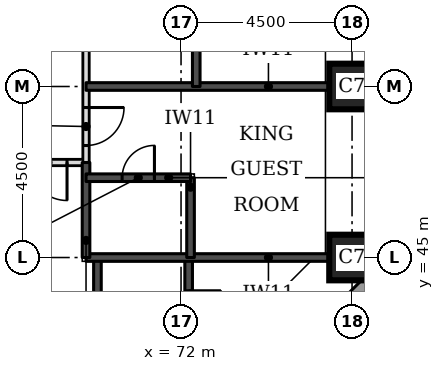
"""IFC4 building model, lengths in metres.
Left out: names, types, materials, properties, quantities, classifications, styles, units other than length and angle.
Written with IfcOpenShell. Run it as: python <this file> out.ifc"""

import sys

from ifc_helpers import new_model, si_unit, direction, frame, frame_2d, origin, origin_2d, place, context, subcontext, project, spatial, rectangle, extrude, element, fill, save


model = new_model("IFC4")
c1 = context("Model", 3, precision=1e-05, world=origin(), true_north=direction((0.0, 1.0)))
c2 = subcontext(c1, "Body", "Model", "MODEL_VIEW")
j1 = project(units=[si_unit("LENGTHUNIT", "METRE"), si_unit("PLANEANGLEUNIT", "RADIAN")], contexts=[c1])
p1 = place(None, origin())
s1 = spatial("IfcSite", under=j1, at=p1, CompositionType="ELEMENT")
p2 = place(p1, origin())
s2 = spatial("IfcBuilding", under=s1, at=p2, CompositionType="ELEMENT")
p3 = place(p2, frame((0.0, 0.0, 52.8)))
s3 = spatial("IfcBuildingStorey", under=s2, at=p3, CompositionType="ELEMENT", Elevation=52.8)
for number, where, z_axis, x_axis in (
    (1, (76.5, 45.0, 0.0), (0.0, 0.0, 1.0), (1.0, 0.0, 0.0)),
    (2, (76.5, 49.5, 0.0), (0.0, 0.0, 1.0), (1.0, 0.0, 0.0)),
):
    element("IfcColumn", number, at=place(p3, frame(where, z_axis=z_axis, x_axis=x_axis)), inside=s3, PredefinedType="COLUMN", context=c2, shape_type="SweptSolid", body=[
        extrude(rectangle(XDim=1.2, YDim=1.2, at=origin_2d()), origin(), (0.0, 0.0, 1.0), 3.3),
    ])
p4 = place(p3, frame((72.27, 39.674, 0.0), z_axis=(0.0, 0.0, 1.0), x_axis=(0.707106781187, 0.707106781187, 0.0)))
e3 = element("IfcWall", 3, at=p4, inside=s3, PredefinedType="STANDARD", context=c2, shape_type="SweptSolid", body=[
    extrude(rectangle(XDim=7.151, YDim=0.35, at=frame_2d((3.576, 0.0))), origin(), (0.0, 0.0, 1.0), 3.055),
])
p5 = place(p4, frame((1.926, 0.0, 0.8)))
e4 = element("IfcOpeningElement", 4, at=p5, cuts=e3, PredefinedType="OPENING", context=c2, shape_type="SweptSolid", body=[
    extrude(rectangle(XDim=3.3, YDim=1.5, at=frame_2d((1.65, 0.75))), frame((0.0, 0.185, 0.0), z_axis=(0.0, -1.0, 0.0), x_axis=(1.0, 0.0, 0.0)), (0.0, 0.0, 1.0), 0.37),
])
p6 = place(p3, frame((52.85, 47.5, 0.0), z_axis=(0.0, 0.0, 1.0), x_axis=(1.0, 0.0, 0.0)))
e5 = element("IfcWall", 5, at=p6, inside=s3, PredefinedType="PARTITIONING", context=c2, shape_type="SweptSolid", body=[
    extrude(rectangle(XDim=16.65, YDim=0.15, at=frame_2d((8.325, 0.0))), origin(), (0.0, 0.0, 1.0), 3.08),
])
p7 = place(p6, frame((11.3, 0.0, 0.0)))
e6 = element("IfcOpeningElement", 6, at=p7, cuts=e5, PredefinedType="OPENING", context=c2, shape_type="SweptSolid", body=[
    extrude(rectangle(XDim=1.1, YDim=2.1, at=frame_2d((0.55, 1.05))), frame((0.0, 0.085, 0.0), z_axis=(0.0, -1.0, 0.0), x_axis=(1.0, 0.0, 0.0)), (0.0, 0.0, 1.0), 0.17),
])
p8 = place(p6, frame((15.15, 0.0, 0.0)))
e7 = element("IfcOpeningElement", 7, at=p8, cuts=e5, PredefinedType="OPENING", context=c2, shape_type="SweptSolid", body=[
    extrude(rectangle(XDim=1.0, YDim=2.1, at=frame_2d((0.5, 1.05))), frame((0.0, 0.085, 0.0), z_axis=(0.0, -1.0, 0.0), x_axis=(1.0, 0.0, 0.0)), (0.0, 0.0, 1.0), 0.17),
])
p9 = place(p3, frame((69.5, 47.5, 0.0), z_axis=(0.0, 0.0, 1.0), x_axis=(0.0, 1.0, 0.0)))
e8 = element("IfcWall", 8, at=p9, inside=s3, PredefinedType="PARTITIONING", context=c2, shape_type="SweptSolid", body=[
    extrude(rectangle(XDim=26.5, YDim=0.15, at=frame_2d((13.25, 0.0))), origin(), (0.0, 0.0, 1.0), 3.08),
])
p10 = place(p9, frame((24.95, 0.0, 0.0)))
e9 = element("IfcOpeningElement", 9, at=p10, cuts=e8, PredefinedType="OPENING", context=c2, shape_type="SweptSolid", body=[
    extrude(rectangle(XDim=1.0, YDim=2.1, at=frame_2d((0.5, 1.05))), frame((0.0, 0.085, 0.0), z_axis=(0.0, -1.0, 0.0), x_axis=(1.0, 0.0, 0.0)), (0.0, 0.0, 1.0), 0.17),
])
p11 = place(p9, frame((20.7, 0.0, 0.0)))
e10 = element("IfcOpeningElement", 10, at=p11, cuts=e8, PredefinedType="OPENING", context=c2, shape_type="SweptSolid", body=[
    extrude(rectangle(XDim=1.0, YDim=2.1, at=frame_2d((0.5, 1.05))), frame((0.0, 0.085, 0.0), z_axis=(0.0, -1.0, 0.0), x_axis=(1.0, 0.0, 0.0)), (0.0, 0.0, 1.0), 0.17),
])
p12 = place(p9, frame((18.55, 0.0, 0.0)))
e11 = element("IfcOpeningElement", 11, at=p12, cuts=e8, PredefinedType="OPENING", context=c2, shape_type="SweptSolid", body=[
    extrude(rectangle(XDim=1.0, YDim=2.1, at=frame_2d((0.5, 1.05))), frame((0.0, 0.085, 0.0), z_axis=(0.0, -1.0, 0.0), x_axis=(1.0, 0.0, 0.0)), (0.0, 0.0, 1.0), 0.17),
])
p13 = place(p9, frame((11.7, 0.0, 0.0)))
e12 = element("IfcOpeningElement", 12, at=p13, cuts=e8, PredefinedType="OPENING", context=c2, shape_type="SweptSolid", body=[
    extrude(rectangle(XDim=1.0, YDim=2.1, at=frame_2d((0.5, 1.05))), frame((0.0, 0.085, 0.0), z_axis=(0.0, -1.0, 0.0), x_axis=(1.0, 0.0, 0.0)), (0.0, 0.0, 1.0), 0.17),
])
p14 = place(p9, frame((7.65, 0.0, 0.0)))
e13 = element("IfcOpeningElement", 13, at=p14, cuts=e8, PredefinedType="OPENING", context=c2, shape_type="SweptSolid", body=[
    extrude(rectangle(XDim=1.1, YDim=2.1, at=frame_2d((0.55, 1.05))), frame((0.0, 0.085, 0.0), z_axis=(0.0, -1.0, 0.0), x_axis=(1.0, 0.0, 0.0)), (0.0, 0.0, 1.0), 0.17),
])
p15 = place(p9, frame((0.447, 0.0, 0.0)))
e14 = element("IfcOpeningElement", 14, at=p15, cuts=e8, PredefinedType="OPENING", context=c2, shape_type="SweptSolid", body=[
    extrude(rectangle(XDim=1.0, YDim=2.1, at=frame_2d((0.5, 1.05))), frame((0.0, 0.085, 0.0), z_axis=(0.0, -1.0, 0.0), x_axis=(1.0, 0.0, 0.0)), (0.0, 0.0, 1.0), 0.17),
])
p16 = place(p3, frame((69.8, 42.5, 0.0), z_axis=(0.0, 0.0, 1.0), x_axis=(0.0, 1.0, 0.0)))
e15 = element("IfcWall", 15, at=p16, inside=s3, PredefinedType="SOLIDWALL", context=c2, shape_type="SweptSolid", body=[
    extrude(rectangle(XDim=2.5, YDim=0.2, at=frame_2d((1.25, 0.0))), origin(), (0.0, 0.0, 1.0), 3.08),
])
p17 = place(p3, frame((72.2, 42.5, 0.0), z_axis=(0.0, 0.0, 1.0), x_axis=(0.0, 1.0, 0.0)))
e16 = element("IfcWall", 16, at=p17, inside=s3, PredefinedType="SOLIDWALL", context=c2, shape_type="SweptSolid", body=[
    extrude(rectangle(XDim=2.5, YDim=0.2, at=frame_2d((1.25, 0.0))), origin(), (0.0, 0.0, 1.0), 3.08),
])
p18 = place(p17, frame((0.775, 0.0, 0.0)))
e17 = element("IfcOpeningElement", 17, at=p18, cuts=e16, PredefinedType="OPENING", context=c2, shape_type="SweptSolid", body=[
    extrude(rectangle(XDim=0.85, YDim=2.1, at=frame_2d((0.425, 1.05))), frame((0.0, 0.11, 0.0), z_axis=(0.0, -1.0, 0.0), x_axis=(1.0, 0.0, 0.0)), (0.0, 0.0, 1.0), 0.22),
])
p19 = place(p3, frame((69.5, 45.0, 0.0), z_axis=(0.0, 0.0, 1.0), x_axis=(1.0, 0.0, 0.0)))
e18 = element("IfcWall", 18, at=p19, inside=s3, PredefinedType="SOLIDWALL", context=c2, shape_type="SweptSolid", body=[
    extrude(rectangle(XDim=6.4, YDim=0.2, at=frame_2d((3.2, 0.0))), origin(), (0.0, 0.0, 1.0), 3.08),
])
p20 = place(p3, frame((69.5, 45.0, 0.0), z_axis=(0.0, 0.0, 1.0), x_axis=(0.0, 1.0, 0.0)))
e19 = element("IfcWall", 19, at=p20, inside=s3, PredefinedType="SOLIDWALL", context=c2, shape_type="SweptSolid", body=[
    extrude(rectangle(XDim=2.5, YDim=0.2, at=frame_2d((1.25, 0.0))), origin(), (0.0, 0.0, 1.0), 3.08),
])
p21 = place(p3, frame((72.25, 45.0, 0.0), z_axis=(0.0, 0.0, 1.0), x_axis=(0.0, 1.0, 0.0)))
e20 = element("IfcWall", 20, at=p21, inside=s3, PredefinedType="SOLIDWALL", context=c2, shape_type="SweptSolid", body=[
    extrude(rectangle(XDim=2.1, YDim=0.2, at=frame_2d((1.05, 0.0))), origin(), (0.0, 0.0, 1.0), 3.08),
])
p22 = place(p3, frame((69.5, 47.1, 0.0), z_axis=(0.0, 0.0, 1.0), x_axis=(1.0, 0.0, 0.0)))
e21 = element("IfcWall", 21, at=p22, inside=s3, PredefinedType="SOLIDWALL", context=c2, shape_type="SweptSolid", body=[
    extrude(rectangle(XDim=2.75, YDim=0.2, at=frame_2d((1.375, 0.0))), origin(), (0.0, 0.0, 1.0), 3.08),
])
p23 = place(p22, frame((0.95, 0.0, 0.0)))
e22 = element("IfcOpeningElement", 22, at=p23, cuts=e21, PredefinedType="OPENING", context=c2, shape_type="SweptSolid", body=[
    extrude(rectangle(XDim=0.85, YDim=2.1, at=frame_2d((0.425, 1.05))), frame((0.0, 0.11, 0.0), z_axis=(0.0, -1.0, 0.0), x_axis=(1.0, 0.0, 0.0)), (0.0, 0.0, 1.0), 0.22),
])
p24 = place(p3, frame((69.5, 49.5, 0.0), z_axis=(0.0, 0.0, 1.0), x_axis=(1.0, 0.0, 0.0)))
e23 = element("IfcWall", 23, at=p24, inside=s3, PredefinedType="SOLIDWALL", context=c2, shape_type="SweptSolid", body=[
    extrude(rectangle(XDim=6.4, YDim=0.2, at=frame_2d((3.2, 0.0))), origin(), (0.0, 0.0, 1.0), 3.08),
])
p25 = place(p3, frame((72.4, 49.5, 0.0), z_axis=(0.0, 0.0, 1.0), x_axis=(0.0, 1.0, 0.0)))
e24 = element("IfcWall", 24, at=p25, inside=s3, PredefinedType="SOLIDWALL", context=c2, shape_type="SweptSolid", body=[
    extrude(rectangle(XDim=3.4, YDim=0.2, at=frame_2d((1.7, 0.0))), origin(), (0.0, 0.0, 1.0), 3.08),
])
p26 = place(p15, frame((1.0, 0.0, 0.0), z_axis=(0.0, 0.0, 1.0), x_axis=(-1.0, 0.0, 0.0)))
e25 = element("IfcDoor", 25, at=p26, inside=s3, OperationType="SINGLE_SWING_LEFT", PredefinedType="DOOR", context=c2, shape_type="SweptSolid", body=[
    extrude(rectangle(XDim=1.0, YDim=2.1, at=frame_2d((0.5, 1.05))), frame((0.0, 0.025, 0.0), z_axis=(0.0, -1.0, 0.0), x_axis=(1.0, 0.0, 0.0)), (0.0, 0.0, 1.0), 0.05),
])
fill(e14, e25)
p27 = place(p23, origin())
e26 = element("IfcDoor", 26, at=p27, inside=s3, OperationType="SINGLE_SWING_RIGHT", PredefinedType="DOOR", context=c2, shape_type="SweptSolid", body=[
    extrude(rectangle(XDim=0.85, YDim=2.1, at=frame_2d((0.425, 1.05))), frame((0.0, 0.025, 0.0), z_axis=(0.0, -1.0, 0.0), x_axis=(1.0, 0.0, 0.0)), (0.0, 0.0, 1.0), 0.05),
])
fill(e22, e26)
p28 = place(p8, frame((1.0, 0.0, 0.0), z_axis=(0.0, 0.0, 1.0), x_axis=(-1.0, 0.0, 0.0)))
e27 = element("IfcDoor", 27, at=p28, inside=s3, OperationType="SINGLE_SWING_LEFT", PredefinedType="DOOR", context=c2, shape_type="SweptSolid", body=[
    extrude(rectangle(XDim=1.0, YDim=2.1, at=frame_2d((0.5, 1.05))), frame((0.0, 0.025, 0.0), z_axis=(0.0, -1.0, 0.0), x_axis=(1.0, 0.0, 0.0)), (0.0, 0.0, 1.0), 0.05),
])
fill(e7, e27)
p29 = place(p18, frame((0.85, 0.0, 0.0), z_axis=(0.0, 0.0, 1.0), x_axis=(-1.0, 0.0, 0.0)))
e28 = element("IfcDoor", 28, at=p29, inside=s3, OperationType="SINGLE_SWING_LEFT", PredefinedType="DOOR", context=c2, shape_type="SweptSolid", body=[
    extrude(rectangle(XDim=0.85, YDim=2.1, at=frame_2d((0.425, 1.05))), frame((0.0, 0.025, 0.0), z_axis=(0.0, -1.0, 0.0), x_axis=(1.0, 0.0, 0.0)), (0.0, 0.0, 1.0), 0.05),
])
fill(e17, e28)
save(model, sys.argv[1])
